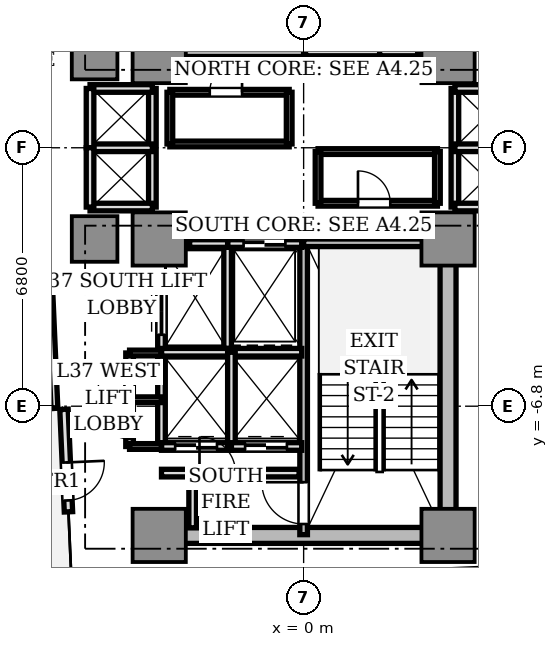
"""IFC4 building model, lengths in metres.
Left out: names, types, materials, properties, quantities, classifications, styles, units other than length and angle.
Written with IfcOpenShell. Run it as: python <this file> out.ifc"""

import sys

from ifc_helpers import new_model, si_unit, direction, frame, frame_2d, origin, origin_2d, place, context, subcontext, project, spatial, rectangle, extrude, source, transform, mapped, element, fill, save


model = new_model("IFC4")
c1 = context("Model", 3, precision=1e-05, world=origin(), true_north=direction((0.0, 1.0)))
c2 = subcontext(c1, "Body", "Model", "MODEL_VIEW")
j1 = project(units=[si_unit("LENGTHUNIT", "METRE"), si_unit("PLANEANGLEUNIT", "RADIAN")], contexts=[c1])
p1 = place(None, origin())
s1 = spatial("IfcSite", under=j1, at=p1, CompositionType="ELEMENT")
p2 = place(p1, origin())
s2 = spatial("IfcBuilding", under=s1, at=p2, CompositionType="ELEMENT")
p3 = place(p2, frame((0.0, 0.0, 134.9)))
s3 = spatial("IfcBuildingStorey", under=s2, at=p3, CompositionType="ELEMENT", Elevation=134.9)
p4 = place(p3, frame((-3.55, -10.2, 0.0), z_axis=(0.0, 0.0, 1.0), x_axis=(1.0, 0.0, 0.0)))
e1 = element("IfcWall", 1, at=p4, inside=s3, PredefinedType="SHEAR", context=c2, shape_type="SweptSolid", body=[
    extrude(rectangle(XDim=7.1, YDim=0.42, at=frame_2d((3.55, 0.0))), origin(), (0.0, 0.0, 1.0), 3.03),
])
p5 = place(p3, frame((3.8, -9.75, 0.0), z_axis=(0.0, 0.0, 1.0), x_axis=(0.0, 1.0, 0.0)))
e2 = element("IfcWall", 2, at=p5, inside=s3, PredefinedType="SHEAR", context=c2, shape_type="SweptSolid", body=[
    extrude(rectangle(XDim=6.9, YDim=0.42, at=frame_2d((3.45, 0.0))), origin(), (0.0, 0.0, 1.0), 3.03),
])
m1 = source(origin(), c2, "Body", "SweptSolid", [
    extrude(rectangle(XDim=1.4, YDim=1.4, at=origin_2d()), origin(), (0.0, 0.0, 1.0), 3.03),
])
for number, where, z_axis, x_axis in (
    (3, (-3.8, 2.4, 0.0), (0.0, 0.0, 1.0), (1.0, 0.0, 0.0)),
    (4, (3.8, 2.4, 0.0), (0.0, 0.0, 1.0), (1.0, 0.0, 0.0)),
    (5, (-3.8, -2.4, 0.0), (0.0, 0.0, 1.0), (1.0, 0.0, 0.0)),
    (6, (3.8, -2.4, 0.0), (0.0, 0.0, 1.0), (1.0, 0.0, 0.0)),
    (7, (-3.8, -10.2, 0.0), (0.0, 0.0, 1.0), (1.0, 0.0, 0.0)),
    (8, (3.8, -10.2, 0.0), (0.0, 0.0, 1.0), (1.0, 0.0, 0.0)),
):
    element("IfcColumn", number, at=place(p3, frame(where, z_axis=z_axis, x_axis=x_axis)), inside=s3, PredefinedType="COLUMN", context=c2, shape_type="MappedRepresentation", body=[
        mapped(m1, transform((0.0, 0.0, 0.0), scale=1.0)),
    ])
m2 = source(origin(), c2, "Body", "SweptSolid", [
    extrude(rectangle(XDim=1.2, YDim=1.2, at=origin_2d()), origin(), (0.0, 0.0, 1.0), 3.03),
])
for number, where, z_axis, x_axis in (
    (9, (-5.5, 2.4, 0.0), (0.0, 0.0, 1.0), (1.0, 0.0, 0.0)),
    (10, (-5.5, -2.4, 0.0), (0.0, 0.0, 1.0), (1.0, 0.0, 0.0)),
):
    element("IfcColumn", number, at=place(p3, frame(where, z_axis=z_axis, x_axis=x_axis)), inside=s3, PredefinedType="COLUMN", context=c2, shape_type="MappedRepresentation", body=[
        mapped(m2, transform((0.0, 0.0, 0.0), scale=1.0)),
    ])
p6 = place(p3, frame((-6.306, -6.882, 0.0), z_axis=(0.0, 0.0, 1.0), x_axis=(0.043672655174, -0.999045894436, 0.0)))
e11 = element("IfcWall", 11, at=p6, inside=s3, PredefinedType="STANDARD", context=c2, shape_type="SweptSolid", body=[
    extrude(rectangle(XDim=2.7, YDim=0.22, at=frame_2d((1.35, 0.0))), origin(), (0.0, 0.0, 1.0), 3.03),
])
p7 = place(p6, frame((1.4, 0.0, 0.0)))
e12 = element("IfcOpeningElement", 12, at=p7, cuts=e11, PredefinedType="OPENING", context=c2, shape_type="SweptSolid", body=[
    extrude(rectangle(XDim=1.0, YDim=2.2, at=frame_2d((0.5, 1.1))), frame((0.0, 0.12, 0.0), z_axis=(0.0, -1.0, 0.0), x_axis=(1.0, 0.0, 0.0)), (0.0, 0.0, 1.0), 0.24),
])
p8 = place(p3, frame((0.0, 2.5, 0.0), z_axis=(0.0, 0.0, 1.0), x_axis=(0.0, 1.0, 0.0)))
e13 = element("IfcWall", 13, at=p8, inside=s3, PredefinedType="SOLIDWALL", context=c2, shape_type="SweptSolid", body=[
    extrude(rectangle(XDim=7.68, YDim=0.2, at=frame_2d((3.84, 0.0))), origin(), (0.0, 0.0, 1.0), 3.03),
])
p9 = place(p8, frame((6.36, 0.0, 0.0)))
e14 = element("IfcOpeningElement", 14, at=p9, cuts=e13, PredefinedType="OPENING", context=c2, shape_type="SweptSolid", body=[
    extrude(rectangle(XDim=1.1, YDim=2.15, at=frame_2d((0.55, 1.075))), frame((0.0, 0.11, 0.0), z_axis=(0.0, -1.0, 0.0), x_axis=(1.0, 0.0, 0.0)), (0.0, 0.0, 1.0), 0.22),
])
p10 = place(p3, frame((-3.72, 2.5, 0.0), z_axis=(0.0, 0.0, 1.0), x_axis=(1.0, 0.0, 0.0)))
e15 = element("IfcWall", 15, at=p10, inside=s3, PredefinedType="SOLIDWALL", context=c2, shape_type="SweptSolid", body=[
    extrude(rectangle(XDim=3.72, YDim=0.2, at=frame_2d((1.86, 0.0))), origin(), (0.0, 0.0, 1.0), 3.03),
])
p11 = place(p3, frame((0.0, -10.18, 0.0), z_axis=(0.0, 0.0, 1.0), x_axis=(0.0, 1.0, 0.0)))
e16 = element("IfcWall", 16, at=p11, inside=s3, PredefinedType="SOLIDWALL", context=c2, shape_type="SweptSolid", body=[
    extrude(rectangle(XDim=7.68, YDim=0.2, at=frame_2d((3.84, 0.0))), origin(), (0.0, 0.0, 1.0), 3.03),
])
p12 = place(p11, frame((0.28, 0.0, 0.0)))
e17 = element("IfcOpeningElement", 17, at=p12, cuts=e16, PredefinedType="OPENING", context=c2, shape_type="SweptSolid", body=[
    extrude(rectangle(XDim=1.1, YDim=2.15, at=frame_2d((0.55, 1.075))), frame((0.0, 0.11, 0.0), z_axis=(0.0, -1.0, 0.0), x_axis=(1.0, 0.0, 0.0)), (0.0, 0.0, 1.0), 0.22),
])
p13 = place(p3, frame((0.0, -2.5, 0.0), z_axis=(0.0, 0.0, 1.0), x_axis=(1.0, 0.0, 0.0)))
e18 = element("IfcWall", 18, at=p13, inside=s3, PredefinedType="SOLIDWALL", context=c2, shape_type="SweptSolid", body=[
    extrude(rectangle(XDim=3.72, YDim=0.2, at=frame_2d((1.86, 0.0))), origin(), (0.0, 0.0, 1.0), 3.03),
])
p14 = place(p3, frame((2.0, 2.5, 0.0), z_axis=(0.0, 0.0, 1.0), x_axis=(0.0, 1.0, 0.0)))
e19 = element("IfcWall", 19, at=p14, inside=s3, PredefinedType="SOLIDWALL", context=c2, shape_type="SweptSolid", body=[
    extrude(rectangle(XDim=2.78, YDim=0.2, at=frame_2d((1.39, 0.0))), origin(), (0.0, 0.0, 1.0), 2.58),
])
p15 = place(p3, frame((0.05, 2.52, 0.0), z_axis=(0.0, 0.0, 1.0), x_axis=(1.0, 0.0, 0.0)))
e20 = element("IfcWall", 20, at=p15, inside=s3, PredefinedType="SOLIDWALL", context=c2, shape_type="SweptSolid", body=[
    extrude(rectangle(XDim=1.95, YDim=0.2, at=frame_2d((0.975, 0.0))), origin(), (0.0, 0.0, 1.0), 2.58),
])
p16 = place(p3, frame((-2.0, -5.28, 0.0), z_axis=(0.0, 0.0, 1.0), x_axis=(0.0, 1.0, 0.0)))
e21 = element("IfcWall", 21, at=p16, inside=s3, PredefinedType="SOLIDWALL", context=c2, shape_type="SweptSolid", body=[
    extrude(rectangle(XDim=2.78, YDim=0.2, at=frame_2d((1.39, 0.0))), origin(), (0.0, 0.0, 1.0), 2.58),
])
p17 = place(p3, frame((-2.0, -2.52, 0.0), z_axis=(0.0, 0.0, 1.0), x_axis=(1.0, 0.0, 0.0)))
e22 = element("IfcWall", 22, at=p17, inside=s3, PredefinedType="SOLIDWALL", context=c2, shape_type="SweptSolid", body=[
    extrude(rectangle(XDim=1.95, YDim=0.2, at=frame_2d((0.975, 0.0))), origin(), (0.0, 0.0, 1.0), 2.58),
])
p18 = place(p17, frame((0.42, 0.0, 0.0)))
e23 = element("IfcOpeningElement", 23, at=p18, cuts=e22, PredefinedType="OPENING", context=c2, shape_type="SweptSolid", body=[
    extrude(rectangle(XDim=1.1, YDim=2.2, at=frame_2d((0.55, 1.1))), frame((0.0, 0.11, 0.0), z_axis=(0.0, -1.0, 0.0), x_axis=(1.0, 0.0, 0.0)), (0.0, 0.0, 1.0), 0.22),
])
for number, where, z_axis, x_axis in (
    (24, (2.0, 2.52, 0.0), (0.0, 0.0, 1.0), (1.0, 0.0, 0.0)),
    (25, (-3.0, -2.52, 0.0), (0.0, 0.0, 1.0), (1.0, 0.0, 0.0)),
):
    element("IfcWall", number, at=place(p3, frame(where, z_axis=z_axis, x_axis=x_axis)), inside=s3, PredefinedType="SOLIDWALL", context=c2, shape_type="SweptSolid", body=[
        extrude(rectangle(XDim=1.0, YDim=0.2, at=frame_2d((0.5, 0.0))), origin(), (0.0, 0.0, 1.0), 2.58),
    ])
p19 = place(p3, frame((-3.74, -5.36, 0.0), z_axis=(0.0, 0.0, 1.0), x_axis=(0.0, 1.0, 0.0)))
e26 = element("IfcWall", 26, at=p19, inside=s3, PredefinedType="SOLIDWALL", context=c2, shape_type="SweptSolid", body=[
    extrude(rectangle(XDim=2.08, YDim=0.2, at=frame_2d((1.04, 0.0))), origin(), (0.0, 0.0, 1.0), 2.58),
])
p20 = place(p19, frame((0.44, 0.0, 0.0)))
e27 = element("IfcOpeningElement", 27, at=p20, cuts=e26, PredefinedType="OPENING", context=c2, shape_type="SweptSolid", body=[
    extrude(rectangle(XDim=1.2, YDim=2.2, at=frame_2d((0.6, 1.1))), frame((0.0, 0.11, 0.0), z_axis=(0.0, -1.0, 0.0), x_axis=(1.0, 0.0, 0.0)), (0.0, 0.0, 1.0), 0.22),
])
p21 = place(p3, frame((-3.74, -7.86, 0.0), z_axis=(0.0, 0.0, 1.0), x_axis=(0.0, 1.0, 0.0)))
e28 = element("IfcWall", 28, at=p21, inside=s3, PredefinedType="SOLIDWALL", context=c2, shape_type="SweptSolid", body=[
    extrude(rectangle(XDim=2.48, YDim=0.2, at=frame_2d((1.24, 0.0))), origin(), (0.0, 0.0, 1.0), 2.58),
])
p22 = place(p3, frame((-3.74, -7.86, 0.0), z_axis=(0.0, 0.0, 1.0), x_axis=(1.0, 0.0, 0.0)))
e29 = element("IfcWall", 29, at=p22, inside=s3, PredefinedType="SOLIDWALL", context=c2, shape_type="SweptSolid", body=[
    extrude(rectangle(XDim=1.84, YDim=0.2, at=frame_2d((0.92, 0.0))), origin(), (0.0, 0.0, 1.0), 2.58),
])
p23 = place(p22, frame((0.36, 0.0, 0.0)))
e30 = element("IfcOpeningElement", 30, at=p23, cuts=e29, PredefinedType="OPENING", context=c2, shape_type="SweptSolid", body=[
    extrude(rectangle(XDim=1.1, YDim=2.2, at=frame_2d((0.55, 1.1))), frame((0.0, 0.11, 0.0), z_axis=(0.0, -1.0, 0.0), x_axis=(1.0, 0.0, 0.0)), (0.0, 0.0, 1.0), 0.22),
])
p24 = place(p3, frame((-3.74, -5.38, 0.0), z_axis=(0.0, 0.0, 1.0), x_axis=(1.0, 0.0, 0.0)))
e31 = element("IfcWall", 31, at=p24, inside=s3, PredefinedType="SOLIDWALL", context=c2, shape_type="SweptSolid", body=[
    extrude(rectangle(XDim=3.69, YDim=0.2, at=frame_2d((1.845, 0.0))), origin(), (0.0, 0.0, 1.0), 2.58),
])
p25 = place(p3, frame((-1.9, -7.86, 0.0), z_axis=(0.0, 0.0, 1.0), x_axis=(0.0, 1.0, 0.0)))
e32 = element("IfcWall", 32, at=p25, inside=s3, PredefinedType="SOLIDWALL", context=c2, shape_type="SweptSolid", body=[
    extrude(rectangle(XDim=2.48, YDim=0.2, at=frame_2d((1.24, 0.0))), origin(), (0.0, 0.0, 1.0), 2.58),
])
p26 = place(p3, frame((-1.9, -7.86, 0.0), z_axis=(0.0, 0.0, 1.0), x_axis=(1.0, 0.0, 0.0)))
e33 = element("IfcWall", 33, at=p26, inside=s3, PredefinedType="SOLIDWALL", context=c2, shape_type="SweptSolid", body=[
    extrude(rectangle(XDim=1.85, YDim=0.2, at=frame_2d((0.925, 0.0))), origin(), (0.0, 0.0, 1.0), 2.58),
])
p27 = place(p26, frame((0.36, 0.0, 0.0)))
e34 = element("IfcOpeningElement", 34, at=p27, cuts=e33, PredefinedType="OPENING", context=c2, shape_type="SweptSolid", body=[
    extrude(rectangle(XDim=1.1, YDim=2.2, at=frame_2d((0.55, 1.1))), frame((0.0, 0.11, 0.0), z_axis=(0.0, -1.0, 0.0), x_axis=(1.0, 0.0, 0.0)), (0.0, 0.0, 1.0), 0.22),
])
p28 = place(p3, frame((3.98, -1.56, 0.0), z_axis=(0.0, 0.0, 1.0), x_axis=(0.0, 1.0, 0.0)))
e35 = element("IfcWall", 35, at=p28, inside=s3, PredefinedType="SOLIDWALL", context=c2, shape_type="SweptSolid", body=[
    extrude(rectangle(XDim=3.12, YDim=0.2, at=frame_2d((1.56, 0.0))), origin(), (0.0, 0.0, 1.0), 2.2),
])
for number, where, z_axis, x_axis in (
    (36, (3.98, 1.56, 0.0), (0.0, 0.0, 1.0), (1.0, 0.0, 0.0)),
    (37, (3.98, -1.56, 0.0), (0.0, 0.0, 1.0), (1.0, 0.0, 0.0)),
    (38, (3.98, 0.0, 0.0), (0.0, 0.0, 1.0), (1.0, 0.0, 0.0)),
):
    element("IfcWall", number, at=place(p3, frame(where, z_axis=z_axis, x_axis=x_axis)), inside=s3, PredefinedType="SOLIDWALL", context=c2, shape_type="SweptSolid", body=[
        extrude(rectangle(XDim=1.64, YDim=0.2, at=frame_2d((0.82, 0.0))), origin(), (0.0, 0.0, 1.0), 2.58),
    ])
p29 = place(p3, frame((-3.98, -1.56, 0.0), z_axis=(0.0, 0.0, 1.0), x_axis=(0.0, 1.0, 0.0)))
e39 = element("IfcWall", 39, at=p29, inside=s3, PredefinedType="SOLIDWALL", context=c2, shape_type="SweptSolid", body=[
    extrude(rectangle(XDim=3.12, YDim=0.2, at=frame_2d((1.56, 0.0))), origin(), (0.0, 0.0, 1.0), 2.2),
])
for number, where, z_axis, x_axis in (
    (40, (-5.62, 1.56, 0.0), (0.0, 0.0, 1.0), (1.0, 0.0, 0.0)),
    (41, (-5.62, -1.56, 0.0), (0.0, 0.0, 1.0), (1.0, 0.0, 0.0)),
    (42, (-5.62, 0.0, 0.0), (0.0, 0.0, 1.0), (1.0, 0.0, 0.0)),
):
    element("IfcWall", number, at=place(p3, frame(where, z_axis=z_axis, x_axis=x_axis)), inside=s3, PredefinedType="SOLIDWALL", context=c2, shape_type="SweptSolid", body=[
        extrude(rectangle(XDim=1.64, YDim=0.2, at=frame_2d((0.82, 0.0))), origin(), (0.0, 0.0, 1.0), 2.58),
    ])
for number, where, z_axis, x_axis in (
    (43, (-5.62, 0.0, 0.0), (0.0, 0.0, 1.0), (0.0, 1.0, 0.0)),
    (44, (-5.62, -1.56, 0.0), (0.0, 0.0, 1.0), (0.0, 1.0, 0.0)),
):
    element("IfcWall", number, at=place(p3, frame(where, z_axis=z_axis, x_axis=x_axis)), inside=s3, PredefinedType="SOLIDWALL", context=c2, shape_type="SweptSolid", body=[
        extrude(rectangle(XDim=1.56, YDim=0.2, at=frame_2d((0.78, 0.0))), origin(), (0.0, 0.0, 1.0), 2.58),
    ])
p30 = place(p3, frame((-3.74, -8.56, 0.0), z_axis=(0.0, 0.0, 1.0), x_axis=(1.0, 0.0, 0.0)))
e45 = element("IfcWall", 45, at=p30, inside=s3, PredefinedType="SOLIDWALL", context=c2, shape_type="SweptSolid", body=[
    extrude(rectangle(XDim=3.62, YDim=0.2, at=frame_2d((1.81, 0.0))), origin(), (0.0, 0.0, 1.0), 2.58),
])
p31 = place(p30, frame((1.0, 0.0, 0.0)))
e46 = element("IfcOpeningElement", 46, at=p31, cuts=e45, PredefinedType="OPENING", context=c2, shape_type="SweptSolid", body=[
    extrude(rectangle(XDim=0.95, YDim=2.15, at=frame_2d((0.475, 1.075))), frame((0.0, 0.11, 0.0), z_axis=(0.0, -1.0, 0.0), x_axis=(1.0, 0.0, 0.0)), (0.0, 0.0, 1.0), 0.22),
])
p32 = place(p3, frame((-2.92, -10.0, 0.0), z_axis=(0.0, 0.0, 1.0), x_axis=(0.0, 1.0, 0.0)))
e47 = element("IfcWall", 47, at=p32, inside=s3, PredefinedType="SOLIDWALL", context=c2, shape_type="SweptSolid", body=[
    extrude(rectangle(XDim=1.44, YDim=0.2, at=frame_2d((0.72, 0.0))), origin(), (0.0, 0.0, 1.0), 2.58),
])
p33 = place(p3, frame((-4.58, -7.86, 0.0), z_axis=(0.0, 0.0, 1.0), x_axis=(0.0, 1.0, 0.0)))
e48 = element("IfcWall", 48, at=p33, inside=s3, PredefinedType="SOLIDWALL", context=c2, shape_type="SweptSolid", body=[
    extrude(rectangle(XDim=2.46, YDim=0.2, at=frame_2d((1.23, 0.0))), origin(), (0.0, 0.0, 1.0), 2.58),
])
p34 = place(p33, frame((0.2, 0.0, 0.0)))
e49 = element("IfcOpeningElement", 49, at=p34, cuts=e48, PredefinedType="OPENING", context=c2, shape_type="SweptSolid", body=[
    extrude(rectangle(XDim=0.85, YDim=2.1, at=frame_2d((0.425, 1.05))), frame((0.0, 0.11, 0.0), z_axis=(0.0, -1.0, 0.0), x_axis=(1.0, 0.0, 0.0)), (0.0, 0.0, 1.0), 0.22),
])
p35 = place(p33, frame((1.38, 0.0, 0.0)))
e50 = element("IfcOpeningElement", 50, at=p35, cuts=e48, PredefinedType="OPENING", context=c2, shape_type="SweptSolid", body=[
    extrude(rectangle(XDim=0.85, YDim=2.1, at=frame_2d((0.425, 1.05))), frame((0.0, 0.11, 0.0), z_axis=(0.0, -1.0, 0.0), x_axis=(1.0, 0.0, 0.0)), (0.0, 0.0, 1.0), 0.22),
])
for number, where, z_axis, x_axis in (
    (51, (-4.58, -5.4, 0.0), (0.0, 0.0, 1.0), (1.0, 0.0, 0.0)),
    (52, (-4.58, -7.86, 0.0), (0.0, 0.0, 1.0), (1.0, 0.0, 0.0)),
    (53, (-4.58, -6.63, 0.0), (0.0, 0.0, 1.0), (1.0, 0.0, 0.0)),
):
    element("IfcWall", number, at=place(p3, frame(where, z_axis=z_axis, x_axis=x_axis)), inside=s3, PredefinedType="PARTITIONING", context=c2, shape_type="SweptSolid", body=[
        extrude(rectangle(XDim=0.84, YDim=0.15, at=frame_2d((0.42, 0.0))), origin(), (0.0, 0.0, 1.0), 2.58),
    ])
p36 = place(p3, frame((-3.52, 0.1, 0.0), z_axis=(0.0, 0.0, 1.0), x_axis=(1.0, 0.0, 0.0)))
e54 = element("IfcWall", 54, at=p36, inside=s3, PredefinedType="PARTITIONING", context=c2, shape_type="SweptSolid", body=[
    extrude(rectangle(XDim=3.14, YDim=0.15, at=frame_2d((1.57, 0.0))), origin(), (0.0, 0.0, 1.0), 2.58),
])
p37 = place(p3, frame((-3.52, 1.46, 0.0), z_axis=(0.0, 0.0, 1.0), x_axis=(1.0, 0.0, 0.0)))
e55 = element("IfcWall", 55, at=p37, inside=s3, PredefinedType="PARTITIONING", context=c2, shape_type="SweptSolid", body=[
    extrude(rectangle(XDim=3.14, YDim=0.15, at=frame_2d((1.57, 0.0))), origin(), (0.0, 0.0, 1.0), 2.58),
])
p38 = place(p37, frame((1.05, 0.0, 0.0)))
e56 = element("IfcOpeningElement", 56, at=p38, cuts=e55, PredefinedType="OPENING", context=c2, shape_type="SweptSolid", body=[
    extrude(rectangle(XDim=0.85, YDim=2.1, at=frame_2d((0.425, 1.05))), frame((0.0, 0.085, 0.0), z_axis=(0.0, -1.0, 0.0), x_axis=(1.0, 0.0, 0.0)), (0.0, 0.0, 1.0), 0.17),
])
p39 = place(p3, frame((-3.52, 0.1, 0.0), z_axis=(0.0, 0.0, 1.0), x_axis=(0.0, 1.0, 0.0)))
e57 = element("IfcWall", 57, at=p39, inside=s3, PredefinedType="PARTITIONING", context=c2, shape_type="SweptSolid", body=[
    extrude(rectangle(XDim=1.36, YDim=0.15, at=frame_2d((0.68, 0.0))), origin(), (0.0, 0.0, 1.0), 2.2),
])
p40 = place(p3, frame((-0.38, 0.1, 0.0), z_axis=(0.0, 0.0, 1.0), x_axis=(0.0, 1.0, 0.0)))
e58 = element("IfcWall", 58, at=p40, inside=s3, PredefinedType="PARTITIONING", context=c2, shape_type="SweptSolid", body=[
    extrude(rectangle(XDim=1.36, YDim=0.15, at=frame_2d((0.68, 0.0))), origin(), (0.0, 0.0, 1.0), 2.58),
])
p41 = place(p3, frame((0.38, -0.1, 0.0), z_axis=(0.0, 0.0, 1.0), x_axis=(1.0, 0.0, 0.0)))
e59 = element("IfcWall", 59, at=p41, inside=s3, PredefinedType="PARTITIONING", context=c2, shape_type="SweptSolid", body=[
    extrude(rectangle(XDim=3.14, YDim=0.15, at=frame_2d((1.57, 0.0))), origin(), (0.0, 0.0, 1.0), 2.58),
])
p42 = place(p3, frame((0.38, -1.46, 0.0), z_axis=(0.0, 0.0, 1.0), x_axis=(1.0, 0.0, 0.0)))
e60 = element("IfcWall", 60, at=p42, inside=s3, PredefinedType="PARTITIONING", context=c2, shape_type="SweptSolid", body=[
    extrude(rectangle(XDim=3.14, YDim=0.15, at=frame_2d((1.57, 0.0))), origin(), (0.0, 0.0, 1.0), 2.58),
])
p43 = place(p42, frame((1.05, 0.0, 0.0)))
e61 = element("IfcOpeningElement", 61, at=p43, cuts=e60, PredefinedType="OPENING", context=c2, shape_type="SweptSolid", body=[
    extrude(rectangle(XDim=0.85, YDim=2.1, at=frame_2d((0.425, 1.05))), frame((0.0, 0.085, 0.0), z_axis=(0.0, -1.0, 0.0), x_axis=(1.0, 0.0, 0.0)), (0.0, 0.0, 1.0), 0.17),
])
p44 = place(p3, frame((0.38, -1.46, 0.0), z_axis=(0.0, 0.0, 1.0), x_axis=(0.0, 1.0, 0.0)))
e62 = element("IfcWall", 62, at=p44, inside=s3, PredefinedType="PARTITIONING", context=c2, shape_type="SweptSolid", body=[
    extrude(rectangle(XDim=1.36, YDim=0.15, at=frame_2d((0.68, 0.0))), origin(), (0.0, 0.0, 1.0), 2.58),
])
p45 = place(p3, frame((3.52, -1.46, 0.0), z_axis=(0.0, 0.0, 1.0), x_axis=(0.0, 1.0, 0.0)))
e63 = element("IfcWall", 63, at=p45, inside=s3, PredefinedType="PARTITIONING", context=c2, shape_type="SweptSolid", body=[
    extrude(rectangle(XDim=1.36, YDim=0.15, at=frame_2d((0.68, 0.0))), origin(), (0.0, 0.0, 1.0), 2.2),
])
p46 = place(p3, frame((-6.71, -3.346, 0.0), z_axis=(0.0, 0.0, 1.0), x_axis=(0.043597663116, -0.999049169846, 0.0)))
e64 = element("IfcWall", 64, at=p46, inside=s3, PredefinedType="PARTITIONING", context=c2, shape_type="SweptSolid", body=[
    extrude(rectangle(XDim=3.5, YDim=0.18, at=frame_2d((1.75, 0.0))), origin(), (0.0, 0.0, 1.0), 2.58),
])
p47 = place(p3, frame((-3.851, -11.529, 0.0), z_axis=(0.0, 0.0, 1.0), x_axis=(0.999048663393, 0.043609267053, 0.0)))
e65 = element("IfcWall", 65, at=p47, inside=s3, PredefinedType="PARTITIONING", context=c2, shape_type="SweptSolid", body=[
    extrude(rectangle(XDim=10.9, YDim=0.18, at=frame_2d((5.45, 0.0))), origin(), (0.0, 0.0, 1.0), 2.58),
])
m3 = source(origin(), c2, "Body", "SweptSolid", [
    extrude(rectangle(XDim=1.0, YDim=0.05, at=origin_2d()), origin(), (0.0, 0.0, 1.0), 2.2),
])
p48 = place(p7, frame((0.5, 0.0, 0.0)))
e66 = element("IfcDoor", 66, at=p48, inside=s3, OperationType="SINGLE_SWING_LEFT", PredefinedType="DOOR", context=c2, shape_type="MappedRepresentation", body=[
    mapped(m3, transform((0.0, 0.0, 0.0), scale=1.0)),
])
fill(e12, e66)
m4 = source(origin(), c2, "Body", "SweptSolid", [
    extrude(rectangle(XDim=1.1, YDim=0.05, at=origin_2d()), origin(), (0.0, 0.0, 1.0), 2.2),
])
p49 = place(p18, frame((0.55, 0.0, 0.0)))
e67 = element("IfcDoor", 67, at=p49, inside=s3, OperationType="DOUBLE_DOOR_SLIDING", PredefinedType="DOOR", context=c2, shape_type="MappedRepresentation", body=[
    mapped(m4, transform((0.0, 0.0, 0.0), scale=1.0)),
])
fill(e23, e67)
m5 = source(origin(), c2, "Body", "SweptSolid", [
    extrude(rectangle(XDim=1.2, YDim=0.05, at=origin_2d()), origin(), (0.0, 0.0, 1.0), 2.2),
])
p50 = place(p20, frame((0.6, 0.0, 0.0)))
e68 = element("IfcDoor", 68, at=p50, inside=s3, OperationType="DOUBLE_DOOR_SLIDING", PredefinedType="DOOR", context=c2, shape_type="MappedRepresentation", body=[
    mapped(m5, transform((0.0, 0.0, 0.0), scale=1.0)),
])
fill(e27, e68)
p51 = place(p23, frame((0.55, 0.0, 0.0)))
e69 = element("IfcDoor", 69, at=p51, inside=s3, OperationType="DOUBLE_DOOR_SLIDING", PredefinedType="DOOR", context=c2, shape_type="MappedRepresentation", body=[
    mapped(m4, transform((0.0, 0.0, 0.0), scale=1.0)),
])
fill(e30, e69)
p52 = place(p27, frame((0.55, 0.0, 0.0)))
e70 = element("IfcDoor", 70, at=p52, inside=s3, OperationType="DOUBLE_DOOR_SLIDING", PredefinedType="DOOR", context=c2, shape_type="MappedRepresentation", body=[
    mapped(m4, transform((0.0, 0.0, 0.0), scale=1.0)),
])
fill(e34, e70)
m6 = source(origin(), c2, "Body", "SweptSolid", [
    extrude(rectangle(XDim=1.1, YDim=0.05, at=origin_2d()), origin(), (0.0, 0.0, 1.0), 2.15),
])
p53 = place(p12, frame((0.55, 0.0, 0.0)))
e71 = element("IfcDoor", 71, at=p53, inside=s3, OperationType="SINGLE_SWING_RIGHT", PredefinedType="DOOR", context=c2, shape_type="MappedRepresentation", body=[
    mapped(m6, transform((0.0, 0.0, 0.0), scale=1.0)),
])
fill(e17, e71)
m7 = source(origin(), c2, "Body", "SweptSolid", [
    extrude(rectangle(XDim=0.95, YDim=0.05, at=origin_2d()), origin(), (0.0, 0.0, 1.0), 2.15),
])
p54 = place(p31, frame((0.475, 0.0, 0.0)))
e72 = element("IfcDoor", 72, at=p54, inside=s3, OperationType="SINGLE_SWING_LEFT", PredefinedType="DOOR", context=c2, shape_type="MappedRepresentation", body=[
    mapped(m7, transform((0.0, 0.0, 0.0), scale=1.0)),
])
fill(e46, e72)
m8 = source(origin(), c2, "Body", "SweptSolid", [
    extrude(rectangle(XDim=0.85, YDim=0.05, at=origin_2d()), origin(), (0.0, 0.0, 1.0), 2.1),
])
p55 = place(p34, frame((0.425, 0.0, 0.0)))
e73 = element("IfcDoor", 73, at=p55, inside=s3, OperationType="SINGLE_SWING_RIGHT", PredefinedType="DOOR", context=c2, shape_type="MappedRepresentation", body=[
    mapped(m8, transform((0.0, 0.0, 0.0), scale=1.0)),
])
fill(e49, e73)
p56 = place(p35, frame((0.425, 0.0, 0.0)))
e74 = element("IfcDoor", 74, at=p56, inside=s3, OperationType="SINGLE_SWING_LEFT", PredefinedType="DOOR", context=c2, shape_type="MappedRepresentation", body=[
    mapped(m8, transform((0.0, 0.0, 0.0), scale=1.0)),
])
fill(e50, e74)
p57 = place(p38, frame((0.425, 0.0, 0.0)))
e75 = element("IfcDoor", 75, at=p57, inside=s3, OperationType="SINGLE_SWING_RIGHT", PredefinedType="DOOR", context=c2, shape_type="MappedRepresentation", body=[
    mapped(m8, transform((0.0, 0.0, 0.0), scale=1.0)),
])
fill(e56, e75)
p58 = place(p43, frame((0.425, 0.0, 0.0)))
e76 = element("IfcDoor", 76, at=p58, inside=s3, OperationType="SINGLE_SWING_LEFT", PredefinedType="DOOR", context=c2, shape_type="MappedRepresentation", body=[
    mapped(m8, transform((0.0, 0.0, 0.0), scale=1.0)),
])
fill(e61, e76)
save(model, sys.argv[1])
